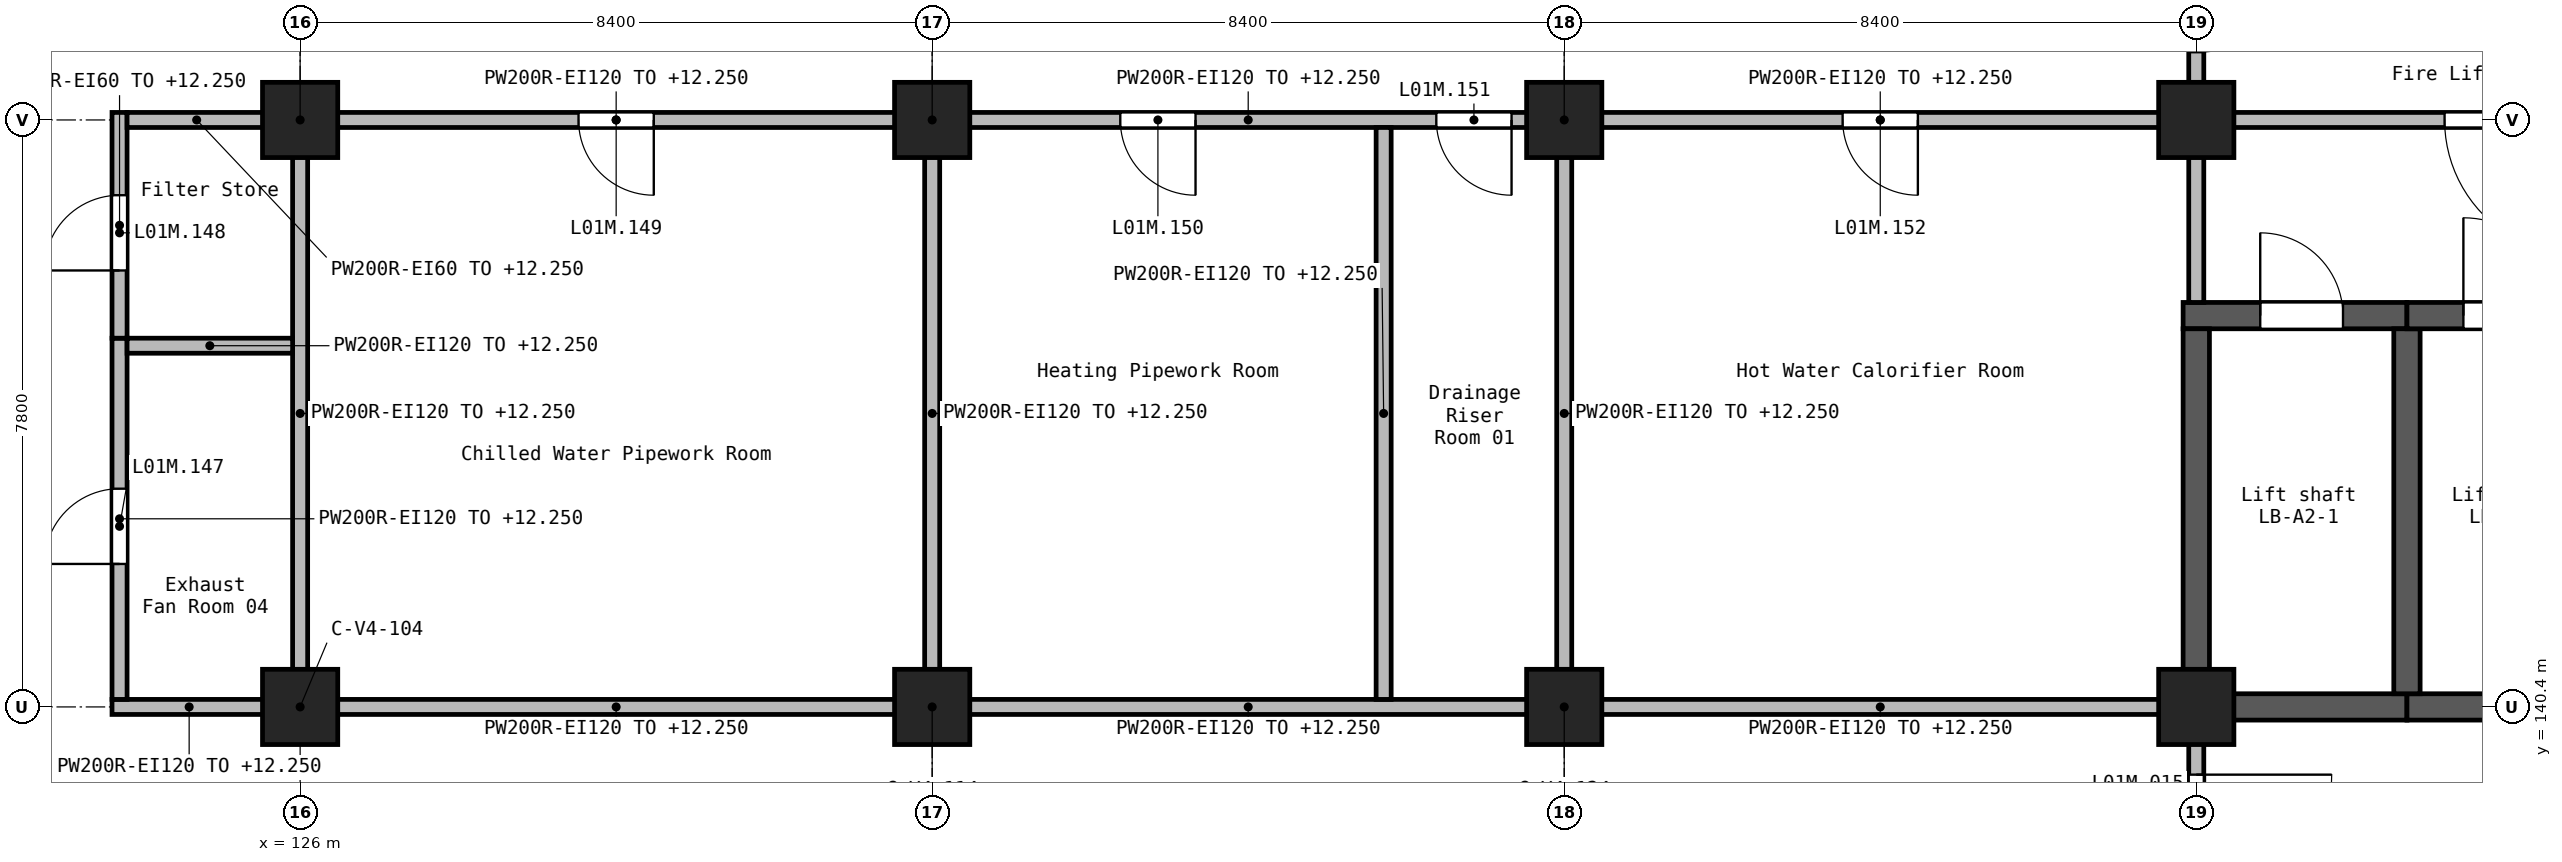
"""IFC4 building model, lengths in metres.
Left out: names, types, materials, properties, quantities, classifications, styles, units other than length and angle.
Written with IfcOpenShell. Run it as: python <this file> out.ifc"""

import sys

from ifc_helpers import new_model, si_unit, direction, frame, frame_2d, origin, origin_2d, place, context, subcontext, project, spatial, rectangle, extrude, element, fill, save


model = new_model("IFC4")
c1 = context("Model", 3, precision=1e-05, world=origin(), true_north=direction((0.0, 1.0)))
c2 = subcontext(c1, "Body", "Model", "MODEL_VIEW")
j1 = project(units=[si_unit("LENGTHUNIT", "METRE"), si_unit("PLANEANGLEUNIT", "RADIAN")], contexts=[c1])
p1 = place(None, origin())
s1 = spatial("IfcSite", under=j1, at=p1, CompositionType="ELEMENT")
p2 = place(p1, origin())
s2 = spatial("IfcBuilding", under=s1, at=p2, CompositionType="ELEMENT")
p3 = place(p2, frame((0.0, 0.0, 9.9)))
s3 = spatial("IfcBuildingStorey", under=s2, at=p3, CompositionType="ELEMENT", Elevation=9.9)
for number, where, z_axis, x_axis in (
    (1, (126.0, 140.4, 0.0), (0.0, 0.0, 1.0), (1.0, 0.0, 0.0)),
    (2, (126.0, 148.2, 0.0), (0.0, 0.0, 1.0), (1.0, 0.0, 0.0)),
    (3, (134.4, 140.4, 0.0), (0.0, 0.0, 1.0), (1.0, 0.0, 0.0)),
    (4, (134.4, 148.2, 0.0), (0.0, 0.0, 1.0), (1.0, 0.0, 0.0)),
    (5, (142.8, 140.4, 0.0), (0.0, 0.0, 1.0), (1.0, 0.0, 0.0)),
    (6, (142.8, 148.2, 0.0), (0.0, 0.0, 1.0), (1.0, 0.0, 0.0)),
    (7, (151.2, 140.4, 0.0), (0.0, 0.0, 1.0), (1.0, 0.0, 0.0)),
    (8, (151.2, 148.2, 0.0), (0.0, 0.0, 1.0), (1.0, 0.0, 0.0)),
):
    element("IfcColumn", number, at=place(p3, frame(where, z_axis=z_axis, x_axis=x_axis)), inside=s3, PredefinedType="COLUMN", context=c2, shape_type="SweptSolid", body=[
        extrude(rectangle(XDim=1.0, YDim=1.0, at=origin_2d()), origin(), (0.0, 0.0, 1.0), 2.7),
    ])
p4 = place(p3, frame((151.025, 145.6, 0.0), z_axis=(0.0, 0.0, 1.0), x_axis=(1.0, 0.0, 0.0)))
e9 = element("IfcWall", 9, at=p4, inside=s3, PredefinedType="SHEAR", context=c2, shape_type="SweptSolid", body=[
    extrude(rectangle(XDim=2.975, YDim=0.35, at=frame_2d((1.488, 0.0))), origin(), (0.0, 0.0, 1.0), 2.7),
])
p5 = place(p4, frame((1.025, 0.0, 0.0)))
e10 = element("IfcOpeningElement", 10, at=p5, cuts=e9, PredefinedType="OPENING", context=c2, shape_type="SweptSolid", body=[
    extrude(rectangle(XDim=1.1, YDim=2.1, at=frame_2d((0.55, 1.05))), frame((0.0, 0.185, 0.0), z_axis=(0.0, -1.0, 0.0), x_axis=(1.0, 0.0, 0.0)), (0.0, 0.0, 1.0), 0.37),
])
p6 = place(p3, frame((151.2, 140.225, 0.0), z_axis=(0.0, 0.0, 1.0), x_axis=(0.0, 1.0, 0.0)))
e11 = element("IfcWall", 11, at=p6, inside=s3, PredefinedType="SHEAR", context=c2, shape_type="SweptSolid", body=[
    extrude(rectangle(XDim=5.2, YDim=0.35, at=frame_2d((2.6, 0.0))), origin(), (0.0, 0.0, 1.0), 2.7),
])
p7 = place(p3, frame((151.375, 140.4, 0.0), z_axis=(0.0, 0.0, 1.0), x_axis=(1.0, 0.0, 0.0)))
e12 = element("IfcWall", 12, at=p7, inside=s3, PredefinedType="SHEAR", context=c2, shape_type="SweptSolid", body=[
    extrude(rectangle(XDim=2.625, YDim=0.35, at=frame_2d((1.312, 0.0))), origin(), (0.0, 0.0, 1.0), 2.7),
])
p8 = place(p3, frame((154.0, 140.4, 0.0), z_axis=(0.0, 0.0, 1.0), x_axis=(1.0, 0.0, 0.0)))
e13 = element("IfcWall", 13, at=p8, inside=s3, PredefinedType="SHEAR", context=c2, shape_type="SweptSolid", body=[
    extrude(rectangle(XDim=2.8, YDim=0.35, at=frame_2d((1.4, 0.0))), origin(), (0.0, 0.0, 1.0), 2.7),
])
p9 = place(p3, frame((154.0, 140.575, 0.0), z_axis=(0.0, 0.0, 1.0), x_axis=(0.0, 1.0, 0.0)))
e14 = element("IfcWall", 14, at=p9, inside=s3, PredefinedType="SHEAR", context=c2, shape_type="SweptSolid", body=[
    extrude(rectangle(XDim=4.85, YDim=0.35, at=frame_2d((2.425, 0.0))), origin(), (0.0, 0.0, 1.0), 2.7),
])
p10 = place(p3, frame((154.0, 145.6, 0.0), z_axis=(0.0, 0.0, 1.0), x_axis=(1.0, 0.0, 0.0)))
e15 = element("IfcWall", 15, at=p10, inside=s3, PredefinedType="SHEAR", context=c2, shape_type="SweptSolid", body=[
    extrude(rectangle(XDim=2.8, YDim=0.35, at=frame_2d((1.4, 0.0))), origin(), (0.0, 0.0, 1.0), 2.7),
])
p11 = place(p10, frame((0.75, 0.0, 0.0)))
e16 = element("IfcOpeningElement", 16, at=p11, cuts=e15, PredefinedType="OPENING", context=c2, shape_type="SweptSolid", body=[
    extrude(rectangle(XDim=1.3, YDim=2.1, at=frame_2d((0.65, 1.05))), frame((0.0, 0.185, 0.0), z_axis=(0.0, -1.0, 0.0), x_axis=(1.0, 0.0, 0.0)), (0.0, 0.0, 1.0), 0.37),
])
p12 = place(p3, frame((159.15, 148.2, 0.0), z_axis=(0.0, 0.0, 1.0), x_axis=(-1.0, 0.0, 0.0)))
e17 = element("IfcWall", 17, at=p12, inside=s3, PredefinedType="SOLIDWALL", context=c2, shape_type="SweptSolid", body=[
    extrude(rectangle(XDim=7.5, YDim=0.2, at=frame_2d((3.75, 0.0))), origin(), (0.0, 0.0, 1.0), 2.35),
])
p13 = place(p12, frame((2.85, 0.0, 0.0)))
e18 = element("IfcOpeningElement", 18, at=p13, cuts=e17, PredefinedType="OPENING", context=c2, shape_type="SweptSolid", body=[
    extrude(rectangle(XDim=1.8, YDim=2.1, at=frame_2d((0.9, 1.05))), frame((0.0, 0.11, 0.0), z_axis=(0.0, -1.0, 0.0), x_axis=(1.0, 0.0, 0.0)), (0.0, 0.0, 1.0), 0.22),
])
p14 = place(p3, frame((150.75, 148.2, 0.0), z_axis=(0.0, 0.0, 1.0), x_axis=(-1.0, 0.0, 0.0)))
e19 = element("IfcWall", 19, at=p14, inside=s3, PredefinedType="SOLIDWALL", context=c2, shape_type="SweptSolid", body=[
    extrude(rectangle(XDim=7.5, YDim=0.2, at=frame_2d((3.75, 0.0))), origin(), (0.0, 0.0, 1.0), 2.35),
])
p15 = place(p14, frame((3.25, 0.0, 0.0)))
e20 = element("IfcOpeningElement", 20, at=p15, cuts=e19, PredefinedType="OPENING", context=c2, shape_type="SweptSolid", body=[
    extrude(rectangle(XDim=1.0, YDim=2.1, at=frame_2d((0.5, 1.05))), frame((0.0, 0.11, 0.0), z_axis=(0.0, -1.0, 0.0), x_axis=(1.0, 0.0, 0.0)), (0.0, 0.0, 1.0), 0.22),
])
p16 = place(p3, frame((142.35, 148.2, 0.0), z_axis=(0.0, 0.0, 1.0), x_axis=(-1.0, 0.0, 0.0)))
e21 = element("IfcWall", 21, at=p16, inside=s3, PredefinedType="SOLIDWALL", context=c2, shape_type="SweptSolid", body=[
    extrude(rectangle(XDim=7.5, YDim=0.2, at=frame_2d((3.75, 0.0))), origin(), (0.0, 0.0, 1.0), 2.35),
])
p17 = place(p16, frame((4.45, 0.0, 0.0)))
e22 = element("IfcOpeningElement", 22, at=p17, cuts=e21, PredefinedType="OPENING", context=c2, shape_type="SweptSolid", body=[
    extrude(rectangle(XDim=1.0, YDim=2.1, at=frame_2d((0.5, 1.05))), frame((0.0, 0.11, 0.0), z_axis=(0.0, -1.0, 0.0), x_axis=(1.0, 0.0, 0.0)), (0.0, 0.0, 1.0), 0.22),
])
p18 = place(p16, frame((0.25, 0.0, 0.0)))
e23 = element("IfcOpeningElement", 23, at=p18, cuts=e21, PredefinedType="OPENING", context=c2, shape_type="SweptSolid", body=[
    extrude(rectangle(XDim=1.0, YDim=2.1, at=frame_2d((0.5, 1.05))), frame((0.0, 0.11, 0.0), z_axis=(0.0, -1.0, 0.0), x_axis=(1.0, 0.0, 0.0)), (0.0, 0.0, 1.0), 0.22),
])
p19 = place(p3, frame((133.95, 148.2, 0.0), z_axis=(0.0, 0.0, 1.0), x_axis=(-1.0, 0.0, 0.0)))
e24 = element("IfcWall", 24, at=p19, inside=s3, PredefinedType="SOLIDWALL", context=c2, shape_type="SweptSolid", body=[
    extrude(rectangle(XDim=7.5, YDim=0.2, at=frame_2d((3.75, 0.0))), origin(), (0.0, 0.0, 1.0), 2.35),
])
p20 = place(p19, frame((3.25, 0.0, 0.0)))
e25 = element("IfcOpeningElement", 25, at=p20, cuts=e24, PredefinedType="OPENING", context=c2, shape_type="SweptSolid", body=[
    extrude(rectangle(XDim=1.0, YDim=2.1, at=frame_2d((0.5, 1.05))), frame((0.0, 0.11, 0.0), z_axis=(0.0, -1.0, 0.0), x_axis=(1.0, 0.0, 0.0)), (0.0, 0.0, 1.0), 0.22),
])
p21 = place(p3, frame((151.2, 151.35, 0.0), z_axis=(0.0, 0.0, 1.0), x_axis=(0.0, -1.0, 0.0)))
e26 = element("IfcWall", 26, at=p21, inside=s3, PredefinedType="SOLIDWALL", context=c2, shape_type="SweptSolid", body=[
    extrude(rectangle(XDim=2.7, YDim=0.2, at=frame_2d((1.35, 0.0))), origin(), (0.0, 0.0, 1.0), 2.35),
])
p22 = place(p21, frame((0.45, 0.0, 0.0)))
e27 = element("IfcOpeningElement", 27, at=p22, cuts=e26, PredefinedType="OPENING", context=c2, shape_type="SweptSolid", body=[
    extrude(rectangle(XDim=1.8, YDim=2.1, at=frame_2d((0.9, 1.05))), frame((0.0, 0.11, 0.0), z_axis=(0.0, -1.0, 0.0), x_axis=(1.0, 0.0, 0.0)), (0.0, 0.0, 1.0), 0.22),
])
p23 = place(p3, frame((151.2, 147.75, 0.0), z_axis=(0.0, 0.0, 1.0), x_axis=(0.0, -1.0, 0.0)))
e28 = element("IfcWall", 28, at=p23, inside=s3, PredefinedType="SOLIDWALL", context=c2, shape_type="SweptSolid", body=[
    extrude(rectangle(XDim=1.975, YDim=0.2, at=frame_2d((0.988, 0.0))), origin(), (0.0, 0.0, 1.0), 2.35),
])
p24 = place(p3, frame((151.2, 139.95, 0.0), z_axis=(0.0, 0.0, 1.0), x_axis=(0.0, -1.0, 0.0)))
e29 = element("IfcWall", 29, at=p24, inside=s3, PredefinedType="SOLIDWALL", context=c2, shape_type="SweptSolid", body=[
    extrude(rectangle(XDim=2.7, YDim=0.2, at=frame_2d((1.35, 0.0))), origin(), (0.0, 0.0, 1.0), 2.35),
])
p25 = place(p24, frame((0.45, 0.0, 0.0)))
e30 = element("IfcOpeningElement", 30, at=p25, cuts=e29, PredefinedType="OPENING", context=c2, shape_type="SweptSolid", body=[
    extrude(rectangle(XDim=1.8, YDim=2.1, at=frame_2d((0.9, 1.05))), frame((0.0, 0.11, 0.0), z_axis=(0.0, -1.0, 0.0), x_axis=(1.0, 0.0, 0.0)), (0.0, 0.0, 1.0), 0.22),
])
for number, where, z_axis, x_axis in (
    (31, (150.75, 140.4, 0.0), (0.0, 0.0, 1.0), (-1.0, 0.0, 0.0)),
    (32, (142.35, 140.4, 0.0), (0.0, 0.0, 1.0), (-1.0, 0.0, 0.0)),
    (33, (133.95, 140.4, 0.0), (0.0, 0.0, 1.0), (-1.0, 0.0, 0.0)),
):
    element("IfcWall", number, at=place(p3, frame(where, z_axis=z_axis, x_axis=x_axis)), inside=s3, PredefinedType="SOLIDWALL", context=c2, shape_type="SweptSolid", body=[
        extrude(rectangle(XDim=7.5, YDim=0.2, at=frame_2d((3.75, 0.0))), origin(), (0.0, 0.0, 1.0), 2.35),
    ])
p26 = place(p3, frame((125.55, 140.4, 0.0), z_axis=(0.0, 0.0, 1.0), x_axis=(-1.0, 0.0, 0.0)))
e34 = element("IfcWall", 34, at=p26, inside=s3, PredefinedType="SOLIDWALL", context=c2, shape_type="SweptSolid", body=[
    extrude(rectangle(XDim=2.05, YDim=0.2, at=frame_2d((1.025, 0.0))), origin(), (0.0, 0.0, 1.0), 2.35),
])
for number, where, z_axis, x_axis in (
    (35, (126.0, 140.85, 0.0), (0.0, 0.0, 1.0), (0.0, 1.0, 0.0)),
    (36, (134.4, 140.85, 0.0), (0.0, 0.0, 1.0), (0.0, 1.0, 0.0)),
):
    element("IfcWall", number, at=place(p3, frame(where, z_axis=z_axis, x_axis=x_axis)), inside=s3, PredefinedType="SOLIDWALL", context=c2, shape_type="SweptSolid", body=[
        extrude(rectangle(XDim=6.9, YDim=0.2, at=frame_2d((3.45, 0.0))), origin(), (0.0, 0.0, 1.0), 2.35),
    ])
p27 = place(p3, frame((140.4, 140.5, 0.0), z_axis=(0.0, 0.0, 1.0), x_axis=(0.0, 1.0, 0.0)))
e37 = element("IfcWall", 37, at=p27, inside=s3, PredefinedType="SOLIDWALL", context=c2, shape_type="SweptSolid", body=[
    extrude(rectangle(XDim=7.6, YDim=0.2, at=frame_2d((3.8, 0.0))), origin(), (0.0, 0.0, 1.0), 2.35),
])
p28 = place(p3, frame((142.8, 140.85, 0.0), z_axis=(0.0, 0.0, 1.0), x_axis=(0.0, 1.0, 0.0)))
e38 = element("IfcWall", 38, at=p28, inside=s3, PredefinedType="SOLIDWALL", context=c2, shape_type="SweptSolid", body=[
    extrude(rectangle(XDim=6.9, YDim=0.2, at=frame_2d((3.45, 0.0))), origin(), (0.0, 0.0, 1.0), 2.35),
])
p29 = place(p3, frame((123.6, 140.5, 0.0), z_axis=(0.0, 0.0, 1.0), x_axis=(0.0, 1.0, 0.0)))
e39 = element("IfcWall", 39, at=p29, inside=s3, PredefinedType="SOLIDWALL", context=c2, shape_type="SweptSolid", body=[
    extrude(rectangle(XDim=4.8, YDim=0.2, at=frame_2d((2.4, 0.0))), origin(), (0.0, 0.0, 1.0), 2.35),
])
p30 = place(p29, frame((1.8, 0.0, 0.0)))
e40 = element("IfcOpeningElement", 40, at=p30, cuts=e39, PredefinedType="OPENING", context=c2, shape_type="SweptSolid", body=[
    extrude(rectangle(XDim=1.0, YDim=2.1, at=frame_2d((0.5, 1.05))), frame((0.0, 0.11, 0.0), z_axis=(0.0, -1.0, 0.0), x_axis=(1.0, 0.0, 0.0)), (0.0, 0.0, 1.0), 0.22),
])
p31 = place(p3, frame((123.6, 145.3, 0.0), z_axis=(0.0, 0.0, 1.0), x_axis=(0.0, 1.0, 0.0)))
e41 = element("IfcWall", 41, at=p31, inside=s3, PredefinedType="SOLIDWALL", context=c2, shape_type="SweptSolid", body=[
    extrude(rectangle(XDim=3.0, YDim=0.2, at=frame_2d((1.5, 0.0))), origin(), (0.0, 0.0, 1.0), 2.35),
])
p32 = place(p31, frame((0.9, 0.0, 0.0)))
e42 = element("IfcOpeningElement", 42, at=p32, cuts=e41, PredefinedType="OPENING", context=c2, shape_type="SweptSolid", body=[
    extrude(rectangle(XDim=1.0, YDim=2.1, at=frame_2d((0.5, 1.05))), frame((0.0, 0.11, 0.0), z_axis=(0.0, -1.0, 0.0), x_axis=(1.0, 0.0, 0.0)), (0.0, 0.0, 1.0), 0.22),
])
p33 = place(p3, frame((123.7, 145.2, 0.0), z_axis=(0.0, 0.0, 1.0), x_axis=(1.0, 0.0, 0.0)))
e43 = element("IfcWall", 43, at=p33, inside=s3, PredefinedType="SOLIDWALL", context=c2, shape_type="SweptSolid", body=[
    extrude(rectangle(XDim=2.2, YDim=0.2, at=frame_2d((1.1, 0.0))), origin(), (0.0, 0.0, 1.0), 2.35),
])
p34 = place(p3, frame((123.7, 148.2, 0.0), z_axis=(0.0, 0.0, 1.0), x_axis=(1.0, 0.0, 0.0)))
e44 = element("IfcWall", 44, at=p34, inside=s3, PredefinedType="SOLIDWALL", context=c2, shape_type="SweptSolid", body=[
    extrude(rectangle(XDim=1.85, YDim=0.2, at=frame_2d((0.925, 0.0))), origin(), (0.0, 0.0, 1.0), 2.35),
])
p35 = place(p25, frame((1.8, 0.0, 0.0), z_axis=(0.0, 0.0, 1.0), x_axis=(-1.0, 0.0, 0.0)))
e45 = element("IfcDoor", 45, at=p35, inside=s3, OperationType="DOUBLE_DOOR_SINGLE_SWING", PredefinedType="DOOR", context=c2, shape_type="SweptSolid", body=[
    extrude(rectangle(XDim=1.8, YDim=2.1, at=frame_2d((0.9, 1.05))), frame((0.0, 0.025, 0.0), z_axis=(0.0, -1.0, 0.0), x_axis=(1.0, 0.0, 0.0)), (0.0, 0.0, 1.0), 0.05),
])
fill(e30, e45)
p36 = place(p22, frame((1.8, 0.0, 0.0), z_axis=(0.0, 0.0, 1.0), x_axis=(-1.0, 0.0, 0.0)))
e46 = element("IfcDoor", 46, at=p36, inside=s3, OperationType="DOUBLE_DOOR_SINGLE_SWING", PredefinedType="DOOR", context=c2, shape_type="SweptSolid", body=[
    extrude(rectangle(XDim=1.8, YDim=2.1, at=frame_2d((0.9, 1.05))), frame((0.0, 0.025, 0.0), z_axis=(0.0, -1.0, 0.0), x_axis=(1.0, 0.0, 0.0)), (0.0, 0.0, 1.0), 0.05),
])
fill(e27, e46)
p37 = place(p13, origin())
e47 = element("IfcDoor", 47, at=p37, inside=s3, OperationType="DOUBLE_DOOR_SINGLE_SWING", PredefinedType="DOOR", context=c2, shape_type="SweptSolid", body=[
    extrude(rectangle(XDim=1.8, YDim=2.1, at=frame_2d((0.9, 1.05))), frame((0.0, 0.025, 0.0), z_axis=(0.0, -1.0, 0.0), x_axis=(1.0, 0.0, 0.0)), (0.0, 0.0, 1.0), 0.05),
])
fill(e18, e47)
p38 = place(p30, frame((1.0, 0.0, 0.0), z_axis=(0.0, 0.0, 1.0), x_axis=(-1.0, 0.0, 0.0)))
e48 = element("IfcDoor", 48, at=p38, inside=s3, OperationType="SINGLE_SWING_RIGHT", PredefinedType="DOOR", context=c2, shape_type="SweptSolid", body=[
    extrude(rectangle(XDim=1.0, YDim=2.1, at=frame_2d((0.5, 1.05))), frame((0.0, 0.025, 0.0), z_axis=(0.0, -1.0, 0.0), x_axis=(1.0, 0.0, 0.0)), (0.0, 0.0, 1.0), 0.05),
])
fill(e40, e48)
p39 = place(p32, frame((1.0, 0.0, 0.0), z_axis=(0.0, 0.0, 1.0), x_axis=(-1.0, 0.0, 0.0)))
e49 = element("IfcDoor", 49, at=p39, inside=s3, OperationType="SINGLE_SWING_RIGHT", PredefinedType="DOOR", context=c2, shape_type="SweptSolid", body=[
    extrude(rectangle(XDim=1.0, YDim=2.1, at=frame_2d((0.5, 1.05))), frame((0.0, 0.025, 0.0), z_axis=(0.0, -1.0, 0.0), x_axis=(1.0, 0.0, 0.0)), (0.0, 0.0, 1.0), 0.05),
])
fill(e42, e49)
p40 = place(p20, origin())
e50 = element("IfcDoor", 50, at=p40, inside=s3, OperationType="SINGLE_SWING_RIGHT", PredefinedType="DOOR", context=c2, shape_type="SweptSolid", body=[
    extrude(rectangle(XDim=1.0, YDim=2.1, at=frame_2d((0.5, 1.05))), frame((0.0, 0.025, 0.0), z_axis=(0.0, -1.0, 0.0), x_axis=(1.0, 0.0, 0.0)), (0.0, 0.0, 1.0), 0.05),
])
fill(e25, e50)
p41 = place(p17, origin())
e51 = element("IfcDoor", 51, at=p41, inside=s3, OperationType="SINGLE_SWING_RIGHT", PredefinedType="DOOR", context=c2, shape_type="SweptSolid", body=[
    extrude(rectangle(XDim=1.0, YDim=2.1, at=frame_2d((0.5, 1.05))), frame((0.0, 0.025, 0.0), z_axis=(0.0, -1.0, 0.0), x_axis=(1.0, 0.0, 0.0)), (0.0, 0.0, 1.0), 0.05),
])
fill(e22, e51)
p42 = place(p18, origin())
e52 = element("IfcDoor", 52, at=p42, inside=s3, OperationType="SINGLE_SWING_LEFT", PredefinedType="DOOR", context=c2, shape_type="SweptSolid", body=[
    extrude(rectangle(XDim=1.0, YDim=2.1, at=frame_2d((0.5, 1.05))), frame((0.0, 0.025, 0.0), z_axis=(0.0, -1.0, 0.0), x_axis=(1.0, 0.0, 0.0)), (0.0, 0.0, 1.0), 0.05),
])
fill(e23, e52)
p43 = place(p15, origin())
e53 = element("IfcDoor", 53, at=p43, inside=s3, OperationType="SINGLE_SWING_LEFT", PredefinedType="DOOR", context=c2, shape_type="SweptSolid", body=[
    extrude(rectangle(XDim=1.0, YDim=2.1, at=frame_2d((0.5, 1.05))), frame((0.0, 0.025, 0.0), z_axis=(0.0, -1.0, 0.0), x_axis=(1.0, 0.0, 0.0)), (0.0, 0.0, 1.0), 0.05),
])
fill(e20, e53)
p44 = place(p5, origin())
e54 = element("IfcDoor", 54, at=p44, inside=s3, OperationType="DOUBLE_DOOR_SLIDING", PredefinedType="DOOR", context=c2, shape_type="SweptSolid", body=[
    extrude(rectangle(XDim=1.1, YDim=2.1, at=frame_2d((0.55, 1.05))), frame((0.0, 0.025, 0.0), z_axis=(0.0, -1.0, 0.0), x_axis=(1.0, 0.0, 0.0)), (0.0, 0.0, 1.0), 0.05),
])
fill(e10, e54)
p45 = place(p11, origin())
e55 = element("IfcDoor", 55, at=p45, inside=s3, OperationType="DOUBLE_DOOR_SLIDING", PredefinedType="DOOR", context=c2, shape_type="SweptSolid", body=[
    extrude(rectangle(XDim=1.3, YDim=2.1, at=frame_2d((0.65, 1.05))), frame((0.0, 0.025, 0.0), z_axis=(0.0, -1.0, 0.0), x_axis=(1.0, 0.0, 0.0)), (0.0, 0.0, 1.0), 0.05),
])
fill(e16, e55)
save(model, sys.argv[1])
